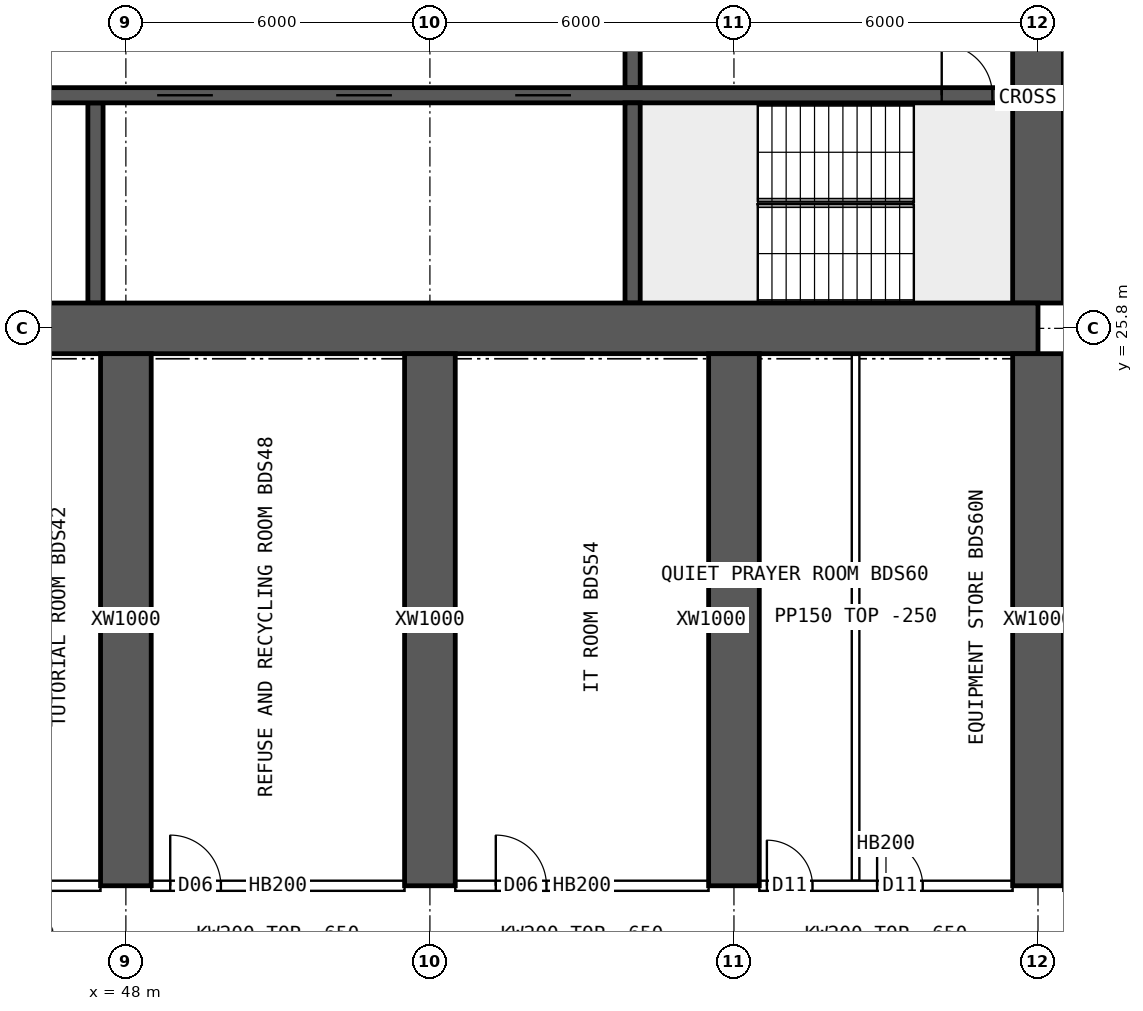
"""IFC4 building model, lengths in metres.
Left out: names, types, materials, properties, quantities, classifications, styles, units other than length and angle.
Written with IfcOpenShell. Run it as: python <this file> out.ifc"""

import sys

from ifc_helpers import new_model, si_unit, direction, frame, frame_2d, origin, place, context, subcontext, project, spatial, rectangle, extrude, element, fill, save


model = new_model("IFC4")
c1 = context("Model", 3, precision=1e-05, world=origin(), true_north=direction((0.0, 1.0)))
c2 = subcontext(c1, "Body", "Model", "MODEL_VIEW")
j1 = project(units=[si_unit("LENGTHUNIT", "METRE"), si_unit("PLANEANGLEUNIT", "RADIAN")], contexts=[c1])
p1 = place(None, origin())
s1 = spatial("IfcSite", under=j1, at=p1, CompositionType="ELEMENT")
p2 = place(p1, origin())
s2 = spatial("IfcBuilding", under=s1, at=p2, CompositionType="ELEMENT")
p3 = place(p2, frame((0.0, 0.0, 16.0)))
s3 = spatial("IfcBuildingStorey", under=s2, at=p3, CompositionType="ELEMENT", Elevation=16.0)
p4 = place(p3, frame((18.0, 25.8, 0.0), z_axis=(0.0, 0.0, 1.0), x_axis=(1.0, 0.0, 0.0)))
e1 = element("IfcWall", 1, at=p4, inside=s3, PredefinedType="SHEAR", context=c2, shape_type="SweptSolid", body=[
    extrude(rectangle(XDim=48.0, YDim=1.0, at=frame_2d((24.0, 0.0))), origin(), (0.0, 0.0, 1.0), 4.2),
])
p5 = place(p3, frame((66.0, 26.3, 0.0), z_axis=(0.0, 0.0, 1.0), x_axis=(0.0, 1.0, 0.0)))
e2 = element("IfcWall", 2, at=p5, inside=s3, PredefinedType="SHEAR", context=c2, shape_type="SweptSolid", body=[
    extrude(rectangle(XDim=11.4, YDim=1.0, at=frame_2d((5.7, 0.0))), origin(), (0.0, 0.0, 1.0), 4.2),
])
p6 = place(p5, frame((5.0, 0.0, 0.0)))
e3 = element("IfcOpeningElement", 3, at=p6, cuts=e2, PredefinedType="OPENING", context=c2, shape_type="SweptSolid", body=[
    extrude(rectangle(XDim=1.2, YDim=2.1, at=frame_2d((0.6, 1.05))), frame((0.0, 0.51, 0.0), z_axis=(0.0, -1.0, 0.0), x_axis=(1.0, 0.0, 0.0)), (0.0, 0.0, 1.0), 1.02),
])
p7 = place(p3, frame((18.5, 30.4, 0.0), z_axis=(0.0, 0.0, 1.0), x_axis=(1.0, 0.0, 0.0)))
e4 = element("IfcWall", 4, at=p7, inside=s3, PredefinedType="SHEAR", context=c2, shape_type="SweptSolid", body=[
    extrude(rectangle(XDim=47.0, YDim=0.3, at=frame_2d((23.5, 0.0))), origin(), (0.0, 0.0, 1.0), 4.2),
])
p8 = place(p7, frame((0.4, 0.0, 0.0)))
e5 = element("IfcOpeningElement", 5, at=p8, cuts=e4, PredefinedType="OPENING", context=c2, shape_type="SweptSolid", body=[
    extrude(rectangle(XDim=1.0, YDim=2.1, at=frame_2d((0.5, 1.05))), frame((0.0, 0.16, 0.0), z_axis=(0.0, -1.0, 0.0), x_axis=(1.0, 0.0, 0.0)), (0.0, 0.0, 1.0), 0.32),
])
p9 = place(p7, frame((45.6, 0.0, 0.0)))
e6 = element("IfcOpeningElement", 6, at=p9, cuts=e4, PredefinedType="OPENING", context=c2, shape_type="SweptSolid", body=[
    extrude(rectangle(XDim=1.0, YDim=2.1, at=frame_2d((0.5, 1.05))), frame((0.0, 0.16, 0.0), z_axis=(0.0, -1.0, 0.0), x_axis=(1.0, 0.0, 0.0)), (0.0, 0.0, 1.0), 0.32),
])
p10 = place(p7, frame((8.25, 0.0, 0.0)))
e7 = element("IfcOpeningElement", 7, at=p10, cuts=e4, PredefinedType="OPENING", context=c2, shape_type="SweptSolid", body=[
    extrude(rectangle(XDim=1.1, YDim=2.1, at=frame_2d((0.55, 1.05))), frame((0.0, 0.16, 0.0), z_axis=(0.0, -1.0, 0.0), x_axis=(1.0, 0.0, 0.0)), (0.0, 0.0, 1.0), 0.32),
])
p11 = place(p7, frame((10.85, 0.0, 0.0)))
e8 = element("IfcOpeningElement", 8, at=p11, cuts=e4, PredefinedType="OPENING", context=c2, shape_type="SweptSolid", body=[
    extrude(rectangle(XDim=1.1, YDim=2.1, at=frame_2d((0.55, 1.05))), frame((0.0, 0.16, 0.0), z_axis=(0.0, -1.0, 0.0), x_axis=(1.0, 0.0, 0.0)), (0.0, 0.0, 1.0), 0.32),
])
p12 = place(p7, frame((13.45, 0.0, 0.0)))
e9 = element("IfcOpeningElement", 9, at=p12, cuts=e4, PredefinedType="OPENING", context=c2, shape_type="SweptSolid", body=[
    extrude(rectangle(XDim=1.1, YDim=2.1, at=frame_2d((0.55, 1.05))), frame((0.0, 0.16, 0.0), z_axis=(0.0, -1.0, 0.0), x_axis=(1.0, 0.0, 0.0)), (0.0, 0.0, 1.0), 0.32),
])
p13 = place(p7, frame((16.05, 0.0, 0.0)))
e10 = element("IfcOpeningElement", 10, at=p13, cuts=e4, PredefinedType="OPENING", context=c2, shape_type="SweptSolid", body=[
    extrude(rectangle(XDim=1.1, YDim=2.1, at=frame_2d((0.55, 1.05))), frame((0.0, 0.16, 0.0), z_axis=(0.0, -1.0, 0.0), x_axis=(1.0, 0.0, 0.0)), (0.0, 0.0, 1.0), 0.32),
])
p14 = place(p7, frame((30.117, 0.0, 0.0)))
e11 = element("IfcOpeningElement", 11, at=p14, cuts=e4, PredefinedType="OPENING", context=c2, shape_type="SweptSolid", body=[
    extrude(rectangle(XDim=1.1, YDim=2.1, at=frame_2d((0.55, 1.05))), frame((0.0, 0.16, 0.0), z_axis=(0.0, -1.0, 0.0), x_axis=(1.0, 0.0, 0.0)), (0.0, 0.0, 1.0), 0.32),
])
p15 = place(p7, frame((33.65, 0.0, 0.0)))
e12 = element("IfcOpeningElement", 12, at=p15, cuts=e4, PredefinedType="OPENING", context=c2, shape_type="SweptSolid", body=[
    extrude(rectangle(XDim=1.1, YDim=2.1, at=frame_2d((0.55, 1.05))), frame((0.0, 0.16, 0.0), z_axis=(0.0, -1.0, 0.0), x_axis=(1.0, 0.0, 0.0)), (0.0, 0.0, 1.0), 0.32),
])
p16 = place(p7, frame((37.183, 0.0, 0.0)))
e13 = element("IfcOpeningElement", 13, at=p16, cuts=e4, PredefinedType="OPENING", context=c2, shape_type="SweptSolid", body=[
    extrude(rectangle(XDim=1.1, YDim=2.1, at=frame_2d((0.55, 1.05))), frame((0.0, 0.16, 0.0), z_axis=(0.0, -1.0, 0.0), x_axis=(1.0, 0.0, 0.0)), (0.0, 0.0, 1.0), 0.32),
])
p17 = place(p3, frame((58.0, 26.3, 0.0), z_axis=(0.0, 0.0, 1.0), x_axis=(0.0, 1.0, 0.0)))
e14 = element("IfcWall", 14, at=p17, inside=s3, PredefinedType="SHEAR", context=c2, shape_type="SweptSolid", body=[
    extrude(rectangle(XDim=3.95, YDim=0.3, at=frame_2d((1.975, 0.0))), origin(), (0.0, 0.0, 1.0), 4.2),
])
p18 = place(p3, frame((58.0, 30.55, 0.0), z_axis=(0.0, 0.0, 1.0), x_axis=(0.0, 1.0, 0.0)))
e15 = element("IfcWall", 15, at=p18, inside=s3, PredefinedType="SHEAR", context=c2, shape_type="SweptSolid", body=[
    extrude(rectangle(XDim=3.9, YDim=0.3, at=frame_2d((1.95, 0.0))), origin(), (0.0, 0.0, 1.0), 4.2),
])
p19 = place(p18, frame((1.4, 0.0, 0.0)))
e16 = element("IfcOpeningElement", 16, at=p19, cuts=e15, PredefinedType="OPENING", context=c2, shape_type="SweptSolid", body=[
    extrude(rectangle(XDim=1.2, YDim=2.1, at=frame_2d((0.6, 1.05))), frame((0.0, 0.16, 0.0), z_axis=(0.0, -1.0, 0.0), x_axis=(1.0, 0.0, 0.0)), (0.0, 0.0, 1.0), 0.32),
])
p20 = place(p3, frame((47.4, 26.3, 0.0), z_axis=(0.0, 0.0, 1.0), x_axis=(0.0, 1.0, 0.0)))
e17 = element("IfcWall", 17, at=p20, inside=s3, PredefinedType="SHEAR", context=c2, shape_type="SweptSolid", body=[
    extrude(rectangle(XDim=3.95, YDim=0.3, at=frame_2d((1.975, 0.0))), origin(), (0.0, 0.0, 1.0), 4.2),
])
for number, where, z_axis, x_axis in (
    (18, (48.0, 14.8, 0.0), (0.0, 0.0, 1.0), (0.0, 1.0, 0.0)),
    (19, (54.0, 14.8, 0.0), (0.0, 0.0, 1.0), (0.0, 1.0, 0.0)),
    (20, (60.0, 14.8, 0.0), (0.0, 0.0, 1.0), (0.0, 1.0, 0.0)),
    (21, (66.0, 14.8, 0.0), (0.0, 0.0, 1.0), (0.0, 1.0, 0.0)),
):
    element("IfcWall", number, at=place(p3, frame(where, z_axis=z_axis, x_axis=x_axis)), inside=s3, PredefinedType="SHEAR", context=c2, shape_type="SweptSolid", body=[
        extrude(rectangle(XDim=10.5, YDim=1.0, at=frame_2d((5.25, 0.0))), origin(), (0.0, 0.0, 1.0), 4.2),
    ])
p21 = place(p3, frame((42.5, 14.8, 0.0), z_axis=(0.0, 0.0, 1.0), x_axis=(1.0, 0.0, 0.0)))
e22 = element("IfcWall", 22, at=p21, inside=s3, PredefinedType="SOLIDWALL", context=c2, shape_type="SweptSolid", body=[
    extrude(rectangle(XDim=5.0, YDim=0.2, at=frame_2d((2.5, 0.0))), origin(), (0.0, 0.0, 1.0), 3.95),
])
p22 = place(p21, frame((0.35, 0.0, 0.0)))
e23 = element("IfcOpeningElement", 23, at=p22, cuts=e22, PredefinedType="OPENING", context=c2, shape_type="SweptSolid", body=[
    extrude(rectangle(XDim=0.9, YDim=2.1, at=frame_2d((0.45, 1.05))), frame((0.0, 0.11, 0.0), z_axis=(0.0, -1.0, 0.0), x_axis=(1.0, 0.0, 0.0)), (0.0, 0.0, 1.0), 0.22),
])
p23 = place(p21, frame((2.425, 0.0, 0.0)))
e24 = element("IfcOpeningElement", 24, at=p23, cuts=e22, PredefinedType="OPENING", context=c2, shape_type="SweptSolid", body=[
    extrude(rectangle(XDim=0.9, YDim=2.1, at=frame_2d((0.45, 1.05))), frame((0.0, 0.11, 0.0), z_axis=(0.0, -1.0, 0.0), x_axis=(1.0, 0.0, 0.0)), (0.0, 0.0, 1.0), 0.22),
])
p24 = place(p3, frame((48.5, 14.8, 0.0), z_axis=(0.0, 0.0, 1.0), x_axis=(1.0, 0.0, 0.0)))
e25 = element("IfcWall", 25, at=p24, inside=s3, PredefinedType="SOLIDWALL", context=c2, shape_type="SweptSolid", body=[
    extrude(rectangle(XDim=5.0, YDim=0.2, at=frame_2d((2.5, 0.0))), origin(), (0.0, 0.0, 1.0), 3.95),
])
p25 = place(p24, frame((0.375, 0.0, 0.0)))
e26 = element("IfcOpeningElement", 26, at=p25, cuts=e25, PredefinedType="OPENING", context=c2, shape_type="SweptSolid", body=[
    extrude(rectangle(XDim=1.0, YDim=2.1, at=frame_2d((0.5, 1.05))), frame((0.0, 0.11, 0.0), z_axis=(0.0, -1.0, 0.0), x_axis=(1.0, 0.0, 0.0)), (0.0, 0.0, 1.0), 0.22),
])
p26 = place(p3, frame((54.5, 14.8, 0.0), z_axis=(0.0, 0.0, 1.0), x_axis=(1.0, 0.0, 0.0)))
e27 = element("IfcWall", 27, at=p26, inside=s3, PredefinedType="SOLIDWALL", context=c2, shape_type="SweptSolid", body=[
    extrude(rectangle(XDim=5.0, YDim=0.2, at=frame_2d((2.5, 0.0))), origin(), (0.0, 0.0, 1.0), 3.95),
])
p27 = place(p26, frame((0.8, 0.0, 0.0)))
e28 = element("IfcOpeningElement", 28, at=p27, cuts=e27, PredefinedType="OPENING", context=c2, shape_type="SweptSolid", body=[
    extrude(rectangle(XDim=1.0, YDim=2.1, at=frame_2d((0.5, 1.05))), frame((0.0, 0.11, 0.0), z_axis=(0.0, -1.0, 0.0), x_axis=(1.0, 0.0, 0.0)), (0.0, 0.0, 1.0), 0.22),
])
p28 = place(p3, frame((60.5, 14.8, 0.0), z_axis=(0.0, 0.0, 1.0), x_axis=(1.0, 0.0, 0.0)))
e29 = element("IfcWall", 29, at=p28, inside=s3, PredefinedType="SOLIDWALL", context=c2, shape_type="SweptSolid", body=[
    extrude(rectangle(XDim=5.0, YDim=0.2, at=frame_2d((2.5, 0.0))), origin(), (0.0, 0.0, 1.0), 3.95),
])
p29 = place(p28, frame((0.15, 0.0, 0.0)))
e30 = element("IfcOpeningElement", 30, at=p29, cuts=e29, PredefinedType="OPENING", context=c2, shape_type="SweptSolid", body=[
    extrude(rectangle(XDim=0.9, YDim=2.1, at=frame_2d((0.45, 1.05))), frame((0.0, 0.11, 0.0), z_axis=(0.0, -1.0, 0.0), x_axis=(1.0, 0.0, 0.0)), (0.0, 0.0, 1.0), 0.22),
])
p30 = place(p28, frame((2.325, 0.0, 0.0)))
e31 = element("IfcOpeningElement", 31, at=p30, cuts=e29, PredefinedType="OPENING", context=c2, shape_type="SweptSolid", body=[
    extrude(rectangle(XDim=0.9, YDim=2.1, at=frame_2d((0.45, 1.05))), frame((0.0, 0.11, 0.0), z_axis=(0.0, -1.0, 0.0), x_axis=(1.0, 0.0, 0.0)), (0.0, 0.0, 1.0), 0.22),
])
p31 = place(p3, frame((62.4, 14.9, 0.0), z_axis=(0.0, 0.0, 1.0), x_axis=(0.0, 1.0, 0.0)))
e32 = element("IfcWall", 32, at=p31, inside=s3, PredefinedType="PARTITIONING", context=c2, shape_type="SweptSolid", body=[
    extrude(rectangle(XDim=10.4, YDim=0.15, at=frame_2d((5.2, 0.0))), origin(), (0.0, 0.0, 1.0), 3.95),
])
p32 = place(p9, origin())
e33 = element("IfcDoor", 33, at=p32, inside=s3, OperationType="SINGLE_SWING_LEFT", PredefinedType="DOOR", context=c2, shape_type="SweptSolid", body=[
    extrude(rectangle(XDim=1.0, YDim=2.1, at=frame_2d((0.5, 1.05))), frame((0.0, 0.025, 0.0), z_axis=(0.0, -1.0, 0.0), x_axis=(1.0, 0.0, 0.0)), (0.0, 0.0, 1.0), 0.05),
])
fill(e6, e33)
p33 = place(p14, origin())
e34 = element("IfcDoor", 34, at=p33, inside=s3, OperationType="DOUBLE_DOOR_SLIDING", PredefinedType="DOOR", context=c2, shape_type="SweptSolid", body=[
    extrude(rectangle(XDim=1.1, YDim=2.1, at=frame_2d((0.55, 1.05))), frame((0.0, 0.025, 0.0), z_axis=(0.0, -1.0, 0.0), x_axis=(1.0, 0.0, 0.0)), (0.0, 0.0, 1.0), 0.05),
])
fill(e11, e34)
p34 = place(p15, origin())
e35 = element("IfcDoor", 35, at=p34, inside=s3, OperationType="DOUBLE_DOOR_SLIDING", PredefinedType="DOOR", context=c2, shape_type="SweptSolid", body=[
    extrude(rectangle(XDim=1.1, YDim=2.1, at=frame_2d((0.55, 1.05))), frame((0.0, 0.025, 0.0), z_axis=(0.0, -1.0, 0.0), x_axis=(1.0, 0.0, 0.0)), (0.0, 0.0, 1.0), 0.05),
])
fill(e12, e35)
p35 = place(p16, origin())
e36 = element("IfcDoor", 36, at=p35, inside=s3, OperationType="DOUBLE_DOOR_SLIDING", PredefinedType="DOOR", context=c2, shape_type="SweptSolid", body=[
    extrude(rectangle(XDim=1.1, YDim=2.1, at=frame_2d((0.55, 1.05))), frame((0.0, 0.025, 0.0), z_axis=(0.0, -1.0, 0.0), x_axis=(1.0, 0.0, 0.0)), (0.0, 0.0, 1.0), 0.05),
])
fill(e13, e36)
p36 = place(p25, origin())
e37 = element("IfcDoor", 37, at=p36, inside=s3, OperationType="SINGLE_SWING_LEFT", PredefinedType="DOOR", context=c2, shape_type="SweptSolid", body=[
    extrude(rectangle(XDim=1.0, YDim=2.1, at=frame_2d((0.5, 1.05))), frame((0.0, 0.025, 0.0), z_axis=(0.0, -1.0, 0.0), x_axis=(1.0, 0.0, 0.0)), (0.0, 0.0, 1.0), 0.05),
])
fill(e26, e37)
p37 = place(p27, origin())
e38 = element("IfcDoor", 38, at=p37, inside=s3, OperationType="SINGLE_SWING_LEFT", PredefinedType="DOOR", context=c2, shape_type="SweptSolid", body=[
    extrude(rectangle(XDim=1.0, YDim=2.1, at=frame_2d((0.5, 1.05))), frame((0.0, 0.025, 0.0), z_axis=(0.0, -1.0, 0.0), x_axis=(1.0, 0.0, 0.0)), (0.0, 0.0, 1.0), 0.05),
])
fill(e28, e38)
p38 = place(p29, origin())
e39 = element("IfcDoor", 39, at=p38, inside=s3, OperationType="SINGLE_SWING_LEFT", PredefinedType="DOOR", context=c2, shape_type="SweptSolid", body=[
    extrude(rectangle(XDim=0.9, YDim=2.1, at=frame_2d((0.45, 1.05))), frame((0.0, 0.025, 0.0), z_axis=(0.0, -1.0, 0.0), x_axis=(1.0, 0.0, 0.0)), (0.0, 0.0, 1.0), 0.05),
])
fill(e30, e39)
p39 = place(p30, origin())
e40 = element("IfcDoor", 40, at=p39, inside=s3, OperationType="SINGLE_SWING_LEFT", PredefinedType="DOOR", context=c2, shape_type="SweptSolid", body=[
    extrude(rectangle(XDim=0.9, YDim=2.1, at=frame_2d((0.45, 1.05))), frame((0.0, 0.025, 0.0), z_axis=(0.0, -1.0, 0.0), x_axis=(1.0, 0.0, 0.0)), (0.0, 0.0, 1.0), 0.05),
])
fill(e31, e40)
save(model, sys.argv[1])
